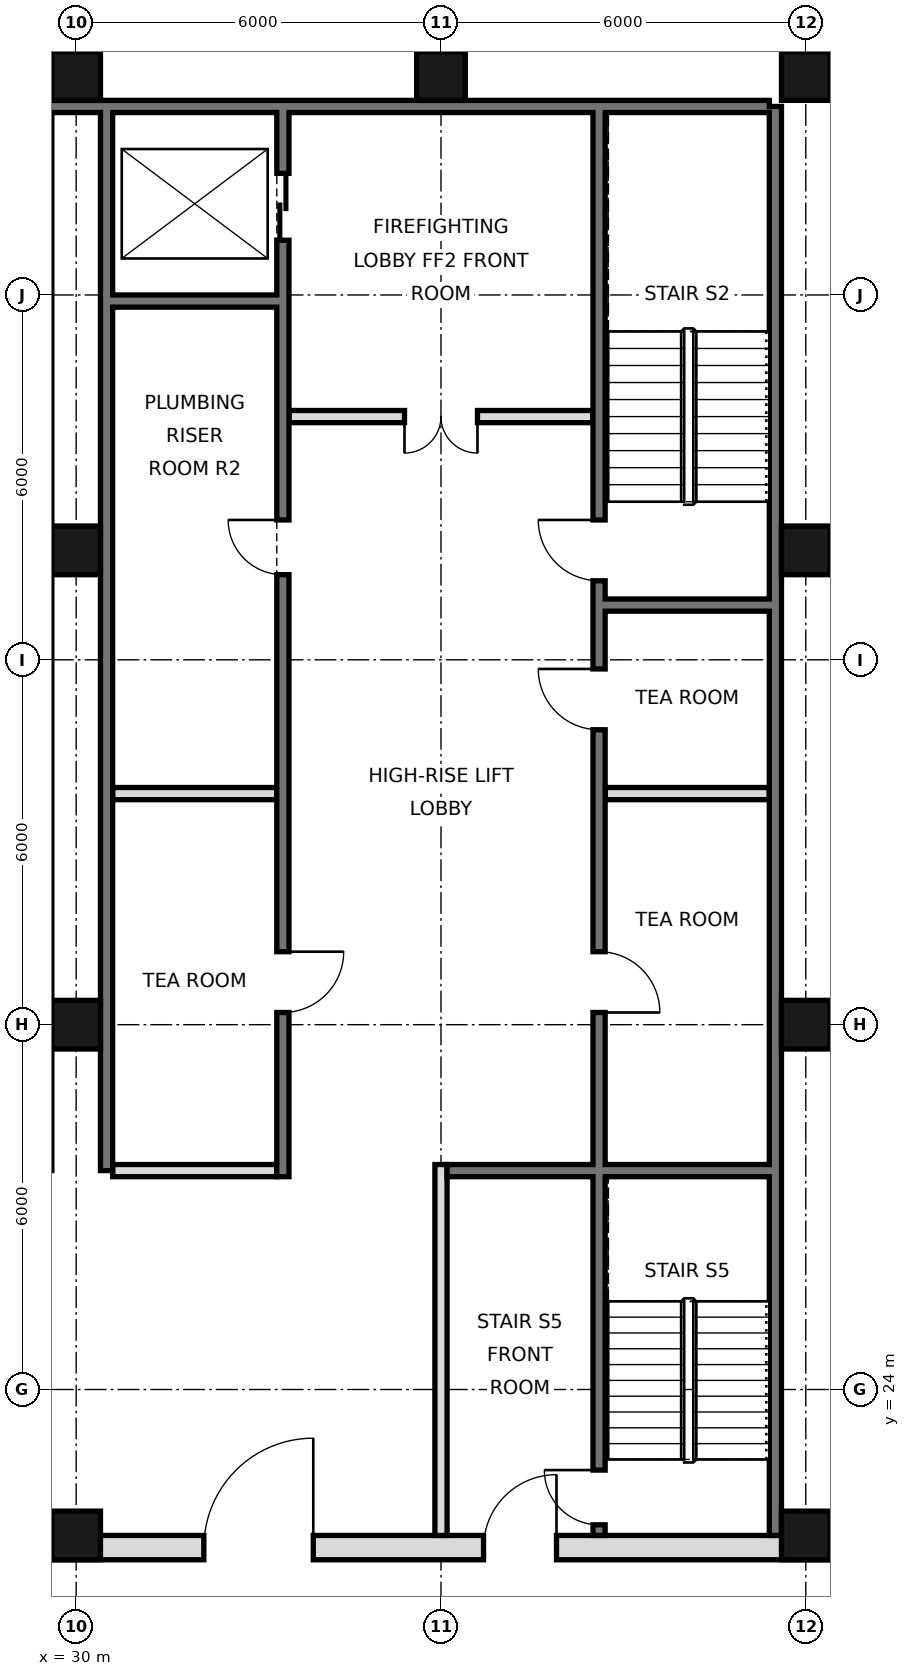
"""IFC4 building model, lengths in metres.
Left out: names, types, materials, properties, quantities, classifications, styles, units other than length and angle.
Written with IfcOpenShell. Run it as: python <this file> out.ifc"""

import sys

from ifc_helpers import new_model, si_unit, direction, frame, frame_2d, origin, origin_2d, place, context, subcontext, project, spatial, rectangle, hollow_rectangle, extrude, element, fill, save


model = new_model("IFC4")
c1 = context("Model", 3, precision=1e-05, world=origin(), true_north=direction((0.0, 1.0)))
c2 = subcontext(c1, "Body", "Model", "MODEL_VIEW")
j1 = project(units=[si_unit("LENGTHUNIT", "METRE"), si_unit("PLANEANGLEUNIT", "RADIAN")], contexts=[c1])
p1 = place(None, origin())
s1 = spatial("IfcSite", under=j1, at=p1, CompositionType="ELEMENT")
p2 = place(p1, origin())
s2 = spatial("IfcBuilding", under=s1, at=p2, CompositionType="ELEMENT")
p3 = place(p2, frame((0.0, 0.0, 154.6)))
s3 = spatial("IfcBuildingStorey", under=s2, at=p3, CompositionType="ELEMENT", Elevation=154.6)
for number, where, z_axis, x_axis in (
    (1, (30.0, 21.6, 0.0), (0.0, 0.0, 1.0), (1.0, 0.0, 0.0)),
    (2, (30.0, 30.0, 0.0), (0.0, 0.0, 1.0), (1.0, 0.0, 0.0)),
    (3, (30.0, 37.8, 0.0), (0.0, 0.0, 1.0), (1.0, 0.0, 0.0)),
    (4, (30.0, 45.6, 0.0), (0.0, 0.0, 1.0), (1.0, 0.0, 0.0)),
    (5, (36.0, 45.6, 0.0), (0.0, 0.0, 1.0), (1.0, 0.0, 0.0)),
    (6, (42.0, 21.6, 0.0), (0.0, 0.0, 1.0), (1.0, 0.0, 0.0)),
    (7, (42.0, 30.0, 0.0), (0.0, 0.0, 1.0), (1.0, 0.0, 0.0)),
    (8, (42.0, 37.8, 0.0), (0.0, 0.0, 1.0), (1.0, 0.0, 0.0)),
    (9, (42.0, 45.6, 0.0), (0.0, 0.0, 1.0), (1.0, 0.0, 0.0)),
):
    element("IfcColumn", number, at=place(p3, frame(where, z_axis=z_axis, x_axis=x_axis)), inside=s3, PredefinedType="COLUMN", context=c2, shape_type="SweptSolid", body=[
        extrude(hollow_rectangle(XDim=0.8, YDim=0.8, WallThickness=0.045, at=origin_2d()), origin(), (0.0, 0.0, 1.0), 3.6),
    ])
p4 = place(p3, frame((41.5, 21.6, 0.0), z_axis=(0.0, 0.0, 1.0), x_axis=(0.0, 1.0, 0.0)))
e10 = element("IfcWall", 10, at=p4, inside=s3, PredefinedType="SOLIDWALL", context=c2, shape_type="SweptSolid", body=[
    extrude(rectangle(XDim=23.5, YDim=0.2, at=frame_2d((11.75, 0.0))), origin(), (0.0, 0.0, 1.0), 3.42),
])
p5 = place(p3, frame((6.6, 45.1, 0.0), z_axis=(0.0, 0.0, 1.0), x_axis=(1.0, 0.0, 0.0)))
e11 = element("IfcWall", 11, at=p5, inside=s3, PredefinedType="SOLIDWALL", context=c2, shape_type="SweptSolid", body=[
    extrude(rectangle(XDim=34.8, YDim=0.2, at=frame_2d((17.4, 0.0))), origin(), (0.0, 0.0, 1.0), 3.42),
])
p6 = place(p3, frame((30.5, 27.6, 0.0), z_axis=(0.0, 0.0, 1.0), x_axis=(0.0, 1.0, 0.0)))
e12 = element("IfcWall", 12, at=p6, inside=s3, PredefinedType="SOLIDWALL", context=c2, shape_type="SweptSolid", body=[
    extrude(rectangle(XDim=17.5, YDim=0.2, at=frame_2d((8.75, 0.0))), origin(), (0.0, 0.0, 1.0), 3.42),
])
p7 = place(p3, frame((5.6, 21.4, 0.0), z_axis=(0.0, 0.0, 1.0), x_axis=(1.0, 0.0, 0.0)))
e13 = element("IfcWall", 13, at=p7, inside=s3, PredefinedType="SOLIDWALL", context=c2, shape_type="SweptSolid", body=[
    extrude(rectangle(XDim=36.8, YDim=0.4, at=frame_2d((18.4, 0.0))), origin(), (0.0, 0.0, 1.0), 3.42),
])
p8 = place(p7, frame((8.5, 0.0, 0.0)))
e14 = element("IfcOpeningElement", 14, at=p8, cuts=e13, PredefinedType="OPENING", context=c2, shape_type="SweptSolid", body=[
    extrude(rectangle(XDim=1.8, YDim=2.1, at=frame_2d((0.9, 1.05))), frame((0.0, 0.21, 0.0), z_axis=(0.0, -1.0, 0.0), x_axis=(1.0, 0.0, 0.0)), (0.0, 0.0, 1.0), 0.42),
])
p9 = place(p7, frame((17.5, 0.0, 0.0)))
e15 = element("IfcOpeningElement", 15, at=p9, cuts=e13, PredefinedType="OPENING", context=c2, shape_type="SweptSolid", body=[
    extrude(rectangle(XDim=1.8, YDim=2.1, at=frame_2d((0.9, 1.05))), frame((0.0, 0.21, 0.0), z_axis=(0.0, -1.0, 0.0), x_axis=(1.0, 0.0, 0.0)), (0.0, 0.0, 1.0), 0.42),
])
p10 = place(p7, frame((26.5, 0.0, 0.0)))
e16 = element("IfcOpeningElement", 16, at=p10, cuts=e13, PredefinedType="OPENING", context=c2, shape_type="SweptSolid", body=[
    extrude(rectangle(XDim=1.8, YDim=2.1, at=frame_2d((0.9, 1.05))), frame((0.0, 0.21, 0.0), z_axis=(0.0, -1.0, 0.0), x_axis=(1.0, 0.0, 0.0)), (0.0, 0.0, 1.0), 0.42),
])
p11 = place(p7, frame((4.5, 0.0, 0.0)))
e17 = element("IfcOpeningElement", 17, at=p11, cuts=e13, PredefinedType="OPENING", context=c2, shape_type="SweptSolid", body=[
    extrude(rectangle(XDim=1.2, YDim=2.1, at=frame_2d((0.6, 1.05))), frame((0.0, 0.21, 0.0), z_axis=(0.0, -1.0, 0.0), x_axis=(1.0, 0.0, 0.0)), (0.0, 0.0, 1.0), 0.42),
])
p12 = place(p7, frame((31.1, 0.0, 0.0)))
e18 = element("IfcOpeningElement", 18, at=p12, cuts=e13, PredefinedType="OPENING", context=c2, shape_type="SweptSolid", body=[
    extrude(rectangle(XDim=1.2, YDim=2.1, at=frame_2d((0.6, 1.05))), frame((0.0, 0.21, 0.0), z_axis=(0.0, -1.0, 0.0), x_axis=(1.0, 0.0, 0.0)), (0.0, 0.0, 1.0), 0.42),
])
p13 = place(p3, frame((33.4, 27.5, 0.0), z_axis=(0.0, 0.0, 1.0), x_axis=(0.0, 1.0, 0.0)))
e19 = element("IfcWall", 19, at=p13, inside=s3, PredefinedType="SOLIDWALL", context=c2, shape_type="SweptSolid", body=[
    extrude(rectangle(XDim=17.5, YDim=0.2, at=frame_2d((8.75, 0.0))), origin(), (0.0, 0.0, 1.0), 3.42),
])
p14 = place(p13, frame((15.4, 0.0, 0.0)))
e20 = element("IfcOpeningElement", 20, at=p14, cuts=e19, PredefinedType="OPENING", context=c2, shape_type="SweptSolid", body=[
    extrude(rectangle(XDim=1.1, YDim=2.1, at=frame_2d((0.55, 1.05))), frame((0.0, 0.11, 0.0), z_axis=(0.0, -1.0, 0.0), x_axis=(1.0, 0.0, 0.0)), (0.0, 0.0, 1.0), 0.22),
])
p15 = place(p13, frame((2.7, 0.0, 0.0)))
e21 = element("IfcOpeningElement", 21, at=p15, cuts=e19, PredefinedType="OPENING", context=c2, shape_type="SweptSolid", body=[
    extrude(rectangle(XDim=1.0, YDim=2.1, at=frame_2d((0.5, 1.05))), frame((0.0, 0.11, 0.0), z_axis=(0.0, -1.0, 0.0), x_axis=(1.0, 0.0, 0.0)), (0.0, 0.0, 1.0), 0.22),
])
p16 = place(p13, frame((9.9, 0.0, 0.0)))
e22 = element("IfcOpeningElement", 22, at=p16, cuts=e19, PredefinedType="OPENING", context=c2, shape_type="SweptSolid", body=[
    extrude(rectangle(XDim=0.9, YDim=2.1, at=frame_2d((0.45, 1.05))), frame((0.0, 0.11, 0.0), z_axis=(0.0, -1.0, 0.0), x_axis=(1.0, 0.0, 0.0)), (0.0, 0.0, 1.0), 0.22),
])
p17 = place(p3, frame((36.0, 21.6, 0.0), z_axis=(0.0, 0.0, 1.0), x_axis=(0.0, 1.0, 0.0)))
e23 = element("IfcWall", 23, at=p17, inside=s3, PredefinedType="PARTITIONING", context=c2, shape_type="SweptSolid", body=[
    extrude(rectangle(XDim=6.1, YDim=0.2, at=frame_2d((3.05, 0.0))), origin(), (0.0, 0.0, 1.0), 3.42),
])
p18 = place(p3, frame((38.6, 21.6, 0.0), z_axis=(0.0, 0.0, 1.0), x_axis=(0.0, 1.0, 0.0)))
e24 = element("IfcWall", 24, at=p18, inside=s3, PredefinedType="SOLIDWALL", context=c2, shape_type="SweptSolid", body=[
    extrude(rectangle(XDim=23.4, YDim=0.2, at=frame_2d((11.7, 0.0))), origin(), (0.0, 0.0, 1.0), 3.42),
])
p19 = place(p18, frame((8.6, 0.0, 0.0)))
e25 = element("IfcOpeningElement", 25, at=p19, cuts=e24, PredefinedType="OPENING", context=c2, shape_type="SweptSolid", body=[
    extrude(rectangle(XDim=1.0, YDim=2.1, at=frame_2d((0.5, 1.05))), frame((0.0, 0.11, 0.0), z_axis=(0.0, -1.0, 0.0), x_axis=(1.0, 0.0, 0.0)), (0.0, 0.0, 1.0), 0.22),
])
p20 = place(p18, frame((13.25, 0.0, 0.0)))
e26 = element("IfcOpeningElement", 26, at=p20, cuts=e24, PredefinedType="OPENING", context=c2, shape_type="SweptSolid", body=[
    extrude(rectangle(XDim=1.0, YDim=2.1, at=frame_2d((0.5, 1.05))), frame((0.0, 0.11, 0.0), z_axis=(0.0, -1.0, 0.0), x_axis=(1.0, 0.0, 0.0)), (0.0, 0.0, 1.0), 0.22),
])
p21 = place(p18, frame((15.7, 0.0, 0.0)))
e27 = element("IfcOpeningElement", 27, at=p21, cuts=e24, PredefinedType="OPENING", context=c2, shape_type="SweptSolid", body=[
    extrude(rectangle(XDim=1.0, YDim=2.1, at=frame_2d((0.5, 1.05))), frame((0.0, 0.11, 0.0), z_axis=(0.0, -1.0, 0.0), x_axis=(1.0, 0.0, 0.0)), (0.0, 0.0, 1.0), 0.22),
])
p22 = place(p18, frame((0.175, 0.0, 0.0)))
e28 = element("IfcOpeningElement", 28, at=p22, cuts=e24, PredefinedType="OPENING", context=c2, shape_type="SweptSolid", body=[
    extrude(rectangle(XDim=0.9, YDim=2.1, at=frame_2d((0.45, 1.05))), frame((0.0, 0.11, 0.0), z_axis=(0.0, -1.0, 0.0), x_axis=(1.0, 0.0, 0.0)), (0.0, 0.0, 1.0), 0.22),
])
p23 = place(p3, frame((30.6, 27.6, 0.0), z_axis=(0.0, 0.0, 1.0), x_axis=(1.0, 0.0, 0.0)))
e29 = element("IfcWall", 29, at=p23, inside=s3, PredefinedType="PARTITIONING", context=c2, shape_type="SweptSolid", body=[
    extrude(rectangle(XDim=2.7, YDim=0.2, at=frame_2d((1.35, 0.0))), origin(), (0.0, 0.0, 1.0), 3.42),
])
p24 = place(p3, frame((36.1, 27.6, 0.0), z_axis=(0.0, 0.0, 1.0), x_axis=(1.0, 0.0, 0.0)))
e30 = element("IfcWall", 30, at=p24, inside=s3, PredefinedType="SOLIDWALL", context=c2, shape_type="SweptSolid", body=[
    extrude(rectangle(XDim=5.3, YDim=0.2, at=frame_2d((2.65, 0.0))), origin(), (0.0, 0.0, 1.0), 3.42),
])
p25 = place(p3, frame((30.6, 33.8, 0.0), z_axis=(0.0, 0.0, 1.0), x_axis=(1.0, 0.0, 0.0)))
e31 = element("IfcWall", 31, at=p25, inside=s3, PredefinedType="SOLIDWALL", context=c2, shape_type="SweptSolid", body=[
    extrude(rectangle(XDim=2.7, YDim=0.2, at=frame_2d((1.35, 0.0))), origin(), (0.0, 0.0, 1.0), 3.42),
])
p26 = place(p3, frame((38.7, 33.8, 0.0), z_axis=(0.0, 0.0, 1.0), x_axis=(1.0, 0.0, 0.0)))
e32 = element("IfcWall", 32, at=p26, inside=s3, PredefinedType="PARTITIONING", context=c2, shape_type="SweptSolid", body=[
    extrude(rectangle(XDim=2.7, YDim=0.2, at=frame_2d((1.35, 0.0))), origin(), (0.0, 0.0, 1.0), 3.42),
])
p27 = place(p3, frame((38.7, 36.9, 0.0), z_axis=(0.0, 0.0, 1.0), x_axis=(1.0, 0.0, 0.0)))
e33 = element("IfcWall", 33, at=p27, inside=s3, PredefinedType="SOLIDWALL", context=c2, shape_type="SweptSolid", body=[
    extrude(rectangle(XDim=2.7, YDim=0.2, at=frame_2d((1.35, 0.0))), origin(), (0.0, 0.0, 1.0), 3.42),
])
p28 = place(p3, frame((33.5, 40.0, 0.0), z_axis=(0.0, 0.0, 1.0), x_axis=(1.0, 0.0, 0.0)))
e34 = element("IfcWall", 34, at=p28, inside=s3, PredefinedType="PARTITIONING", context=c2, shape_type="SweptSolid", body=[
    extrude(rectangle(XDim=5.0, YDim=0.2, at=frame_2d((2.5, 0.0))), origin(), (0.0, 0.0, 1.0), 3.42),
])
p29 = place(p28, frame((1.9, 0.0, 0.0)))
e35 = element("IfcOpeningElement", 35, at=p29, cuts=e34, PredefinedType="OPENING", context=c2, shape_type="SweptSolid", body=[
    extrude(rectangle(XDim=1.2, YDim=2.1, at=frame_2d((0.6, 1.05))), frame((0.0, 0.11, 0.0), z_axis=(0.0, -1.0, 0.0), x_axis=(1.0, 0.0, 0.0)), (0.0, 0.0, 1.0), 0.22),
])
p30 = place(p3, frame((30.6, 41.9, 0.0), z_axis=(0.0, 0.0, 1.0), x_axis=(1.0, 0.0, 0.0)))
e36 = element("IfcWall", 36, at=p30, inside=s3, PredefinedType="SOLIDWALL", context=c2, shape_type="SweptSolid", body=[
    extrude(rectangle(XDim=2.7, YDim=0.2, at=frame_2d((1.35, 0.0))), origin(), (0.0, 0.0, 1.0), 3.42),
])
p31 = place(p10, frame((1.8, 0.0, 0.0), z_axis=(0.0, 0.0, 1.0), x_axis=(-1.0, 0.0, 0.0)))
e37 = element("IfcDoor", 37, at=p31, inside=s3, OperationType="SINGLE_SWING_LEFT", PredefinedType="DOOR", context=c2, shape_type="SweptSolid", body=[
    extrude(rectangle(XDim=1.8, YDim=2.1, at=frame_2d((0.9, 1.05))), frame((0.0, 0.025, 0.0), z_axis=(0.0, -1.0, 0.0), x_axis=(1.0, 0.0, 0.0)), (0.0, 0.0, 1.0), 0.05),
])
fill(e16, e37)
p32 = place(p12, frame((1.2, 0.0, 0.0), z_axis=(0.0, 0.0, 1.0), x_axis=(-1.0, 0.0, 0.0)))
e38 = element("IfcDoor", 38, at=p32, inside=s3, OperationType="SINGLE_SWING_LEFT", PredefinedType="DOOR", context=c2, shape_type="SweptSolid", body=[
    extrude(rectangle(XDim=1.2, YDim=2.1, at=frame_2d((0.6, 1.05))), frame((0.0, 0.025, 0.0), z_axis=(0.0, -1.0, 0.0), x_axis=(1.0, 0.0, 0.0)), (0.0, 0.0, 1.0), 0.05),
])
fill(e18, e38)
p33 = place(p29, frame((1.2, 0.0, 0.0), z_axis=(0.0, 0.0, 1.0), x_axis=(-1.0, 0.0, 0.0)))
e39 = element("IfcDoor", 39, at=p33, inside=s3, OperationType="DOUBLE_DOOR_SINGLE_SWING", PredefinedType="DOOR", context=c2, shape_type="SweptSolid", body=[
    extrude(rectangle(XDim=1.2, YDim=2.1, at=frame_2d((0.6, 1.05))), frame((0.0, 0.025, 0.0), z_axis=(0.0, -1.0, 0.0), x_axis=(1.0, 0.0, 0.0)), (0.0, 0.0, 1.0), 0.05),
])
fill(e35, e39)
p34 = place(p14, origin())
e40 = element("IfcDoor", 40, at=p34, inside=s3, OperationType="DOUBLE_DOOR_SLIDING", PredefinedType="DOOR", context=c2, shape_type="SweptSolid", body=[
    extrude(rectangle(XDim=1.1, YDim=2.1, at=frame_2d((0.55, 1.05))), frame((0.0, 0.025, 0.0), z_axis=(0.0, -1.0, 0.0), x_axis=(1.0, 0.0, 0.0)), (0.0, 0.0, 1.0), 0.05),
])
fill(e20, e40)
p35 = place(p19, frame((1.0, 0.0, 0.0), z_axis=(0.0, 0.0, 1.0), x_axis=(-1.0, 0.0, 0.0)))
e41 = element("IfcDoor", 41, at=p35, inside=s3, OperationType="SINGLE_SWING_RIGHT", PredefinedType="DOOR", context=c2, shape_type="SweptSolid", body=[
    extrude(rectangle(XDim=1.0, YDim=2.1, at=frame_2d((0.5, 1.05))), frame((0.0, 0.025, 0.0), z_axis=(0.0, -1.0, 0.0), x_axis=(1.0, 0.0, 0.0)), (0.0, 0.0, 1.0), 0.05),
])
fill(e25, e41)
p36 = place(p20, frame((1.0, 0.0, 0.0), z_axis=(0.0, 0.0, 1.0), x_axis=(-1.0, 0.0, 0.0)))
e42 = element("IfcDoor", 42, at=p36, inside=s3, OperationType="SINGLE_SWING_LEFT", PredefinedType="DOOR", context=c2, shape_type="SweptSolid", body=[
    extrude(rectangle(XDim=1.0, YDim=2.1, at=frame_2d((0.5, 1.05))), frame((0.0, 0.025, 0.0), z_axis=(0.0, -1.0, 0.0), x_axis=(1.0, 0.0, 0.0)), (0.0, 0.0, 1.0), 0.05),
])
fill(e26, e42)
p37 = place(p15, origin())
e43 = element("IfcDoor", 43, at=p37, inside=s3, OperationType="SINGLE_SWING_RIGHT", PredefinedType="DOOR", context=c2, shape_type="SweptSolid", body=[
    extrude(rectangle(XDim=1.0, YDim=2.1, at=frame_2d((0.5, 1.05))), frame((0.0, 0.025, 0.0), z_axis=(0.0, -1.0, 0.0), x_axis=(1.0, 0.0, 0.0)), (0.0, 0.0, 1.0), 0.05),
])
fill(e21, e43)
p38 = place(p21, frame((1.0, 0.0, 0.0), z_axis=(0.0, 0.0, 1.0), x_axis=(-1.0, 0.0, 0.0)))
e44 = element("IfcDoor", 44, at=p38, inside=s3, OperationType="SINGLE_SWING_LEFT", PredefinedType="DOOR", context=c2, shape_type="SweptSolid", body=[
    extrude(rectangle(XDim=1.0, YDim=2.1, at=frame_2d((0.5, 1.05))), frame((0.0, 0.025, 0.0), z_axis=(0.0, -1.0, 0.0), x_axis=(1.0, 0.0, 0.0)), (0.0, 0.0, 1.0), 0.05),
])
fill(e27, e44)
p39 = place(p22, frame((0.9, 0.0, 0.0), z_axis=(0.0, 0.0, 1.0), x_axis=(-1.0, 0.0, 0.0)))
e45 = element("IfcDoor", 45, at=p39, inside=s3, OperationType="SINGLE_SWING_LEFT", PredefinedType="DOOR", context=c2, shape_type="SweptSolid", body=[
    extrude(rectangle(XDim=0.9, YDim=2.1, at=frame_2d((0.45, 1.05))), frame((0.0, 0.025, 0.0), z_axis=(0.0, -1.0, 0.0), x_axis=(1.0, 0.0, 0.0)), (0.0, 0.0, 1.0), 0.05),
])
fill(e28, e45)
p40 = place(p16, frame((0.9, 0.0, 0.0), z_axis=(0.0, 0.0, 1.0), x_axis=(-1.0, 0.0, 0.0)))
e46 = element("IfcDoor", 46, at=p40, inside=s3, OperationType="SINGLE_SWING_LEFT", PredefinedType="DOOR", context=c2, shape_type="SweptSolid", body=[
    extrude(rectangle(XDim=0.9, YDim=2.1, at=frame_2d((0.45, 1.05))), frame((0.0, 0.025, 0.0), z_axis=(0.0, -1.0, 0.0), x_axis=(1.0, 0.0, 0.0)), (0.0, 0.0, 1.0), 0.05),
])
fill(e22, e46)
save(model, sys.argv[1])
